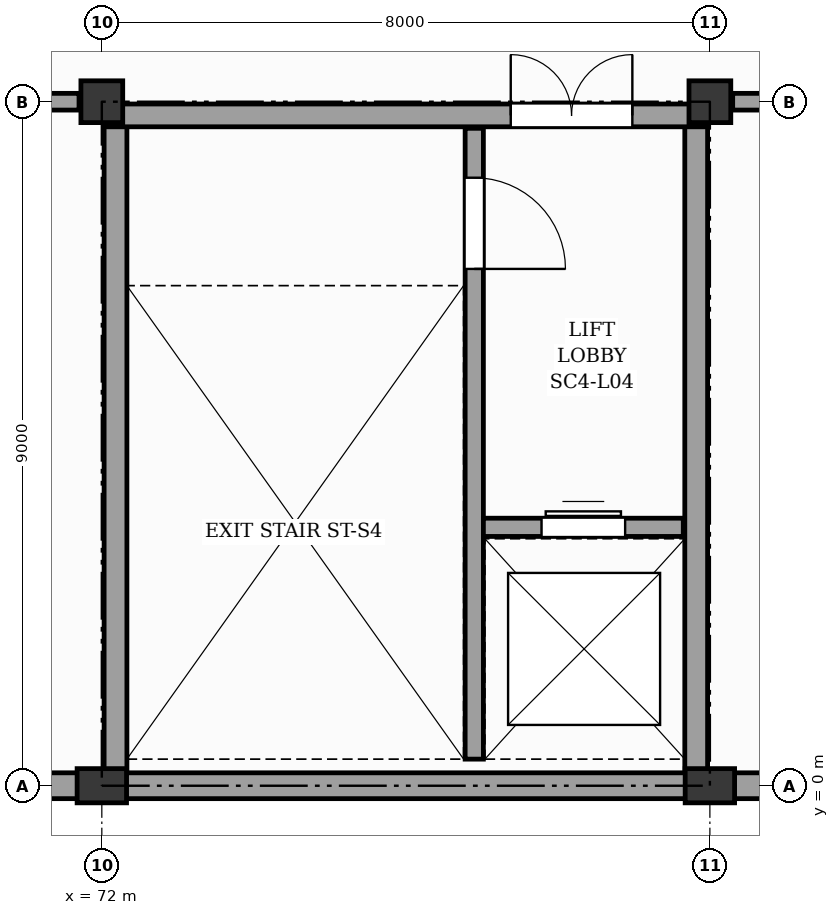
"""IFC4 building model, lengths in metres.
Left out: names, types, materials, properties, quantities, classifications, styles, units other than length and angle.
Written with IfcOpenShell. Run it as: python <this file> out.ifc"""

import sys

from ifc_helpers import new_model, si_unit, direction, frame, frame_2d, origin, origin_2d, place, context, subcontext, project, spatial, rectangle, extrude, element, fill, save


model = new_model("IFC4")
c1 = context("Model", 3, precision=1e-05, world=origin(), true_north=direction((0.0, 1.0)))
c2 = subcontext(c1, "Body", "Model", "MODEL_VIEW")
j1 = project(units=[si_unit("LENGTHUNIT", "METRE"), si_unit("PLANEANGLEUNIT", "RADIAN")], contexts=[c1])
p1 = place(None, origin())
s1 = spatial("IfcSite", under=j1, at=p1, CompositionType="ELEMENT")
p2 = place(p1, origin())
s2 = spatial("IfcBuilding", under=s1, at=p2, CompositionType="ELEMENT")
p3 = place(p2, frame((0.0, 0.0, 20.4)))
s3 = spatial("IfcBuildingStorey", under=s2, at=p3, CompositionType="ELEMENT", Elevation=20.4)
p4 = place(p3, frame((72.0, 0.0, 0.0), z_axis=(0.0, 0.0, 1.0), x_axis=(1.0, 0.0, 0.0)))
e1 = element("IfcColumn", 1, at=p4, inside=s3, PredefinedType="PILASTER", context=c2, shape_type="SweptSolid", body=[
    extrude(rectangle(XDim=0.65, YDim=0.45, at=origin_2d()), origin(), (0.0, 0.0, 1.0), 4.2),
])
p5 = place(p3, frame((72.0, 9.0, 0.0), z_axis=(0.0, 0.0, 1.0), x_axis=(1.0, 0.0, 0.0)))
e2 = element("IfcColumn", 2, at=p5, inside=s3, PredefinedType="COLUMN", context=c2, shape_type="SweptSolid", body=[
    extrude(rectangle(XDim=0.55, YDim=0.55, at=origin_2d()), origin(), (0.0, 0.0, 1.0), 4.2),
])
p6 = place(p3, frame((80.0, 0.0, 0.0), z_axis=(0.0, 0.0, 1.0), x_axis=(1.0, 0.0, 0.0)))
e3 = element("IfcColumn", 3, at=p6, inside=s3, PredefinedType="PILASTER", context=c2, shape_type="SweptSolid", body=[
    extrude(rectangle(XDim=0.65, YDim=0.45, at=origin_2d()), origin(), (0.0, 0.0, 1.0), 4.2),
])
p7 = place(p3, frame((80.0, 9.0, 0.0), z_axis=(0.0, 0.0, 1.0), x_axis=(1.0, 0.0, 0.0)))
e4 = element("IfcColumn", 4, at=p7, inside=s3, PredefinedType="COLUMN", context=c2, shape_type="SweptSolid", body=[
    extrude(rectangle(XDim=0.55, YDim=0.55, at=origin_2d()), origin(), (0.0, 0.0, 1.0), 4.2),
])
for number, where, z_axis, x_axis in (
    (5, (64.32, 0.0, 0.0), (0.0, 0.0, 1.0), (1.0, 0.0, 0.0)),
    (6, (72.32, 0.0, 0.0), (0.0, 0.0, 1.0), (1.0, 0.0, 0.0)),
    (7, (80.32, 0.0, 0.0), (0.0, 0.0, 1.0), (1.0, 0.0, 0.0)),
):
    element("IfcWall", number, at=place(p3, frame(where, z_axis=z_axis, x_axis=x_axis)), inside=s3, PredefinedType="SOLIDWALL", context=c2, shape_type="SweptSolid", body=[
        extrude(rectangle(XDim=7.36, YDim=0.34, at=frame_2d((3.68, 0.0))), origin(), (0.0, 0.0, 1.0), 3.18),
    ])
p8 = place(p3, frame((76.9, 0.35, 0.0), z_axis=(0.0, 0.0, 1.0), x_axis=(0.0, 1.0, 0.0)))
e8 = element("IfcWall", 8, at=p8, inside=s3, PredefinedType="SHEAR", context=c2, shape_type="SweptSolid", body=[
    extrude(rectangle(XDim=8.3, YDim=0.24, at=frame_2d((4.15, 0.0))), origin(), (0.0, 0.0, 1.0), 3.98),
])
p9 = place(p8, frame((6.45, 0.0, 0.0)))
e9 = element("IfcOpeningElement", 9, at=p9, cuts=e8, PredefinedType="OPENING", context=c2, shape_type="SweptSolid", body=[
    extrude(rectangle(XDim=1.2, YDim=2.15, at=frame_2d((0.6, 1.075))), frame((0.0, 0.13, 0.0), z_axis=(0.0, -1.0, 0.0), x_axis=(1.0, 0.0, 0.0)), (0.0, 0.0, 1.0), 0.26),
])
p10 = place(p3, frame((77.02, 3.4, 0.0), z_axis=(0.0, 0.0, 1.0), x_axis=(1.0, 0.0, 0.0)))
e10 = element("IfcWall", 10, at=p10, inside=s3, PredefinedType="SHEAR", context=c2, shape_type="SweptSolid", body=[
    extrude(rectangle(XDim=2.63, YDim=0.24, at=frame_2d((1.315, 0.0))), origin(), (0.0, 0.0, 1.0), 3.98),
])
p11 = place(p10, frame((0.765, 0.0, 0.0)))
e11 = element("IfcOpeningElement", 11, at=p11, cuts=e10, PredefinedType="OPENING", context=c2, shape_type="SweptSolid", body=[
    extrude(rectangle(XDim=1.1, YDim=2.15, at=frame_2d((0.55, 1.075))), frame((0.0, 0.13, 0.0), z_axis=(0.0, -1.0, 0.0), x_axis=(1.0, 0.0, 0.0)), (0.0, 0.0, 1.0), 0.26),
])
for number, where, z_axis, x_axis in (
    (12, (72.18, 0.18, 0.0), (0.0, 0.0, 1.0), (0.0, 1.0, 0.0)),
    (13, (79.82, 0.18, 0.0), (0.0, 0.0, 1.0), (0.0, 1.0, 0.0)),
):
    element("IfcWall", number, at=place(p3, frame(where, z_axis=z_axis, x_axis=x_axis)), inside=s3, PredefinedType="SHEAR", context=c2, shape_type="SweptSolid", body=[
        extrude(rectangle(XDim=8.64, YDim=0.3, at=frame_2d((4.32, 0.0))), origin(), (0.0, 0.0, 1.0), 3.98),
    ])
p12 = place(p3, frame((72.03, 8.82, 0.0), z_axis=(0.0, 0.0, 1.0), x_axis=(1.0, 0.0, 0.0)))
e14 = element("IfcWall", 14, at=p12, inside=s3, PredefinedType="SHEAR", context=c2, shape_type="SweptSolid", body=[
    extrude(rectangle(XDim=7.94, YDim=0.3, at=frame_2d((3.97, 0.0))), origin(), (0.0, 0.0, 1.0), 3.98),
])
p13 = place(p12, frame((5.35, 0.0, 0.0)))
e15 = element("IfcOpeningElement", 15, at=p13, cuts=e14, PredefinedType="OPENING", context=c2, shape_type="SweptSolid", body=[
    extrude(rectangle(XDim=1.6, YDim=2.15, at=frame_2d((0.8, 1.075))), frame((0.0, 0.16, 0.0), z_axis=(0.0, -1.0, 0.0), x_axis=(1.0, 0.0, 0.0)), (0.0, 0.0, 1.0), 0.32),
])
p14 = place(p3, frame((80.3, 9.0, 0.0), z_axis=(0.0, 0.0, 1.0), x_axis=(1.0, 0.0, 0.0)))
e16 = element("IfcWall", 16, at=p14, inside=s3, PredefinedType="SOLIDWALL", context=c2, shape_type="SweptSolid", body=[
    extrude(rectangle(XDim=7.4, YDim=0.22, at=frame_2d((3.7, 0.0))), origin(), (0.0, 0.0, 1.0), 3.1),
])
p15 = place(p14, frame((2.95, 0.0, 0.0)))
e17 = element("IfcOpeningElement", 17, at=p15, cuts=e16, PredefinedType="OPENING", context=c2, shape_type="SweptSolid", body=[
    extrude(rectangle(XDim=1.5, YDim=2.2, at=frame_2d((0.75, 1.1))), frame((0.0, 0.12, 0.0), z_axis=(0.0, -1.0, 0.0), x_axis=(1.0, 0.0, 0.0)), (0.0, 0.0, 1.0), 0.24),
])
p16 = place(p3, frame((64.3, 9.0, 0.0), z_axis=(0.0, 0.0, 1.0), x_axis=(1.0, 0.0, 0.0)))
e18 = element("IfcWall", 18, at=p16, inside=s3, PredefinedType="SOLIDWALL", context=c2, shape_type="SweptSolid", body=[
    extrude(rectangle(XDim=7.4, YDim=0.22, at=frame_2d((3.7, 0.0))), origin(), (0.0, 0.0, 1.0), 3.1),
])
p17 = place(p16, frame((2.95, 0.0, 0.0)))
e19 = element("IfcOpeningElement", 19, at=p17, cuts=e18, PredefinedType="OPENING", context=c2, shape_type="SweptSolid", body=[
    extrude(rectangle(XDim=1.5, YDim=2.2, at=frame_2d((0.75, 1.1))), frame((0.0, 0.12, 0.0), z_axis=(0.0, -1.0, 0.0), x_axis=(1.0, 0.0, 0.0)), (0.0, 0.0, 1.0), 0.24),
])
p18 = place(p9, frame((1.2, 0.0, 0.0), z_axis=(0.0, 0.0, 1.0), x_axis=(-1.0, 0.0, 0.0)))
e20 = element("IfcDoor", 20, at=p18, inside=s3, OperationType="SINGLE_SWING_LEFT", PredefinedType="DOOR", context=c2, shape_type="SweptSolid", body=[
    extrude(rectangle(XDim=1.2, YDim=2.15, at=frame_2d((0.6, 1.075))), frame((0.0, 0.025, 0.0), z_axis=(0.0, -1.0, 0.0), x_axis=(1.0, 0.0, 0.0)), (0.0, 0.0, 1.0), 0.05),
])
fill(e9, e20)
p19 = place(p11, origin())
e21 = element("IfcDoor", 21, at=p19, inside=s3, OperationType="DOUBLE_DOOR_SLIDING", PredefinedType="DOOR", context=c2, shape_type="SweptSolid", body=[
    extrude(rectangle(XDim=1.1, YDim=2.15, at=frame_2d((0.55, 1.075))), frame((0.0, 0.025, 0.0), z_axis=(0.0, -1.0, 0.0), x_axis=(1.0, 0.0, 0.0)), (0.0, 0.0, 1.0), 0.05),
])
fill(e11, e21)
p20 = place(p13, origin())
e22 = element("IfcDoor", 22, at=p20, inside=s3, OperationType="DOUBLE_DOOR_SINGLE_SWING", PredefinedType="DOOR", context=c2, shape_type="SweptSolid", body=[
    extrude(rectangle(XDim=1.6, YDim=2.15, at=frame_2d((0.8, 1.075))), frame((0.0, 0.025, 0.0), z_axis=(0.0, -1.0, 0.0), x_axis=(1.0, 0.0, 0.0)), (0.0, 0.0, 1.0), 0.05),
])
fill(e15, e22)
save(model, sys.argv[1])
